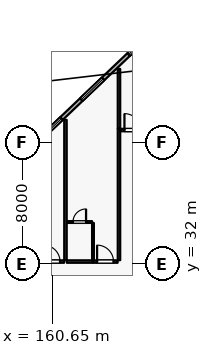
"""IFC4 building model, lengths in metres.
Left out: names, types, materials, properties, quantities, classifications, styles, units other than length and angle.
Written with IfcOpenShell. Run it as: python <this file> out.ifc"""

import sys

from ifc_helpers import new_model, si_unit, direction, frame, frame_2d, origin, place, context, subcontext, project, spatial, rectangle, extrude, element, fill, save


model = new_model("IFC4")
c1 = context("Model", 3, precision=1e-05, world=origin(), true_north=direction((0.0, 1.0)))
c2 = subcontext(c1, "Body", "Model", "MODEL_VIEW")
j1 = project(units=[si_unit("LENGTHUNIT", "METRE"), si_unit("PLANEANGLEUNIT", "RADIAN")], contexts=[c1])
p1 = place(None, origin())
s1 = spatial("IfcSite", under=j1, at=p1, CompositionType="ELEMENT")
p2 = place(p1, origin())
s2 = spatial("IfcBuilding", under=s1, at=p2, CompositionType="ELEMENT")
p3 = place(p2, frame((0.0, 0.0, 28.8)))
s3 = spatial("IfcBuildingStorey", under=s2, at=p3, CompositionType="ELEMENT", Elevation=28.8)
p4 = place(p3, frame((159.95, 40.333, 0.0), z_axis=(0.0, 0.0, 1.0), x_axis=(0.724105170588, 0.689689569247, 0.0)))
e1 = element("IfcWall", 1, at=p4, inside=s3, PredefinedType="SOLIDWALL", context=c2, shape_type="SweptSolid", body=[
    extrude(rectangle(XDim=10.634, YDim=0.24, at=frame_2d((5.317, 0.0))), origin(), (0.0, 0.0, 1.0), 2.93),
])
p5 = place(p4, frame((0.215, 0.0, 0.8)))
e2 = element("IfcOpeningElement", 2, at=p5, cuts=e1, PredefinedType="OPENING", context=c2, shape_type="SweptSolid", body=[
    extrude(rectangle(XDim=1.6, YDim=1.6, at=frame_2d((0.8, 0.8))), frame((0.0, 0.13, 0.0), z_axis=(0.0, -1.0, 0.0), x_axis=(1.0, 0.0, 0.0)), (0.0, 0.0, 1.0), 0.26),
])
p6 = place(p4, frame((3.599, 0.0, 0.8)))
e3 = element("IfcOpeningElement", 3, at=p6, cuts=e1, PredefinedType="OPENING", context=c2, shape_type="SweptSolid", body=[
    extrude(rectangle(XDim=2.0, YDim=1.75, at=frame_2d((1.0, 0.875))), frame((0.0, 0.13, 0.0), z_axis=(0.0, -1.0, 0.0), x_axis=(1.0, 0.0, 0.0)), (0.0, 0.0, 1.0), 0.26),
])
p7 = place(p4, frame((7.901, 0.0, 0.8)))
e4 = element("IfcOpeningElement", 4, at=p7, cuts=e1, PredefinedType="OPENING", context=c2, shape_type="SweptSolid", body=[
    extrude(rectangle(XDim=2.0, YDim=1.75, at=frame_2d((1.0, 0.875))), frame((0.0, 0.13, 0.0), z_axis=(0.0, -1.0, 0.0), x_axis=(1.0, 0.0, 0.0)), (0.0, 0.0, 1.0), 0.26),
])
p8 = place(p3, frame((159.81, 32.17, 0.0), z_axis=(0.0, 0.0, 1.0), x_axis=(1.0, 0.0, 0.0)))
e5 = element("IfcWall", 5, at=p8, inside=s3, PredefinedType="PARTITIONING", context=c2, shape_type="SweptSolid", body=[
    extrude(rectangle(XDim=1.62, YDim=0.16, at=frame_2d((0.81, 0.0))), origin(), (0.0, 0.0, 1.0), 3.365),
])
p9 = place(p8, frame((0.27, 0.0, 0.0)))
e6 = element("IfcOpeningElement", 6, at=p9, cuts=e5, PredefinedType="OPENING", context=c2, shape_type="SweptSolid", body=[
    extrude(rectangle(XDim=1.08, YDim=2.3, at=frame_2d((0.54, 1.15))), frame((0.0, 0.09, 0.0), z_axis=(0.0, -1.0, 0.0), x_axis=(1.0, 0.0, 0.0)), (0.0, 0.0, 1.0), 0.18),
])
p10 = place(p3, frame((161.61, 32.17, 0.0), z_axis=(0.0, 0.0, 1.0), x_axis=(1.0, 0.0, 0.0)))
e7 = element("IfcWall", 7, at=p10, inside=s3, PredefinedType="PARTITIONING", context=c2, shape_type="SweptSolid", body=[
    extrude(rectangle(XDim=1.71, YDim=0.16, at=frame_2d((0.855, 0.0))), origin(), (0.0, 0.0, 1.0), 3.365),
])
p11 = place(p3, frame((163.33, 32.17, 0.0), z_axis=(0.0, 0.0, 1.0), x_axis=(1.0, 0.0, 0.0)))
e8 = element("IfcWall", 8, at=p11, inside=s3, PredefinedType="PARTITIONING", context=c2, shape_type="SweptSolid", body=[
    extrude(rectangle(XDim=1.62, YDim=0.16, at=frame_2d((0.81, 0.0))), origin(), (0.0, 0.0, 1.0), 3.365),
])
p12 = place(p11, frame((0.27, 0.0, 0.0)))
e9 = element("IfcOpeningElement", 9, at=p12, cuts=e8, PredefinedType="OPENING", context=c2, shape_type="SweptSolid", body=[
    extrude(rectangle(XDim=1.08, YDim=2.3, at=frame_2d((0.54, 1.15))), frame((0.0, 0.09, 0.0), z_axis=(0.0, -1.0, 0.0), x_axis=(1.0, 0.0, 0.0)), (0.0, 0.0, 1.0), 0.18),
])
p13 = place(p3, frame((163.33, 32.26, 0.0), z_axis=(0.0, 0.0, 1.0), x_axis=(0.0, 1.0, 0.0)))
e10 = element("IfcWall", 10, at=p13, inside=s3, PredefinedType="PARTITIONING", context=c2, shape_type="SweptSolid", body=[
    extrude(rectangle(XDim=2.45, YDim=0.115, at=frame_2d((1.225, 0.0))), origin(), (0.0, 0.0, 1.0), 3.365),
])
p14 = place(p3, frame((161.62, 34.77, 0.0), z_axis=(0.0, 0.0, 1.0), x_axis=(1.0, 0.0, 0.0)))
e11 = element("IfcWall", 11, at=p14, inside=s3, PredefinedType="PARTITIONING", context=c2, shape_type="SweptSolid", body=[
    extrude(rectangle(XDim=1.65, YDim=0.115, at=frame_2d((0.825, 0.0))), origin(), (0.0, 0.0, 1.0), 3.365),
])
p15 = place(p14, frame((0.395, 0.0, 0.0)))
e12 = element("IfcOpeningElement", 12, at=p15, cuts=e11, PredefinedType="OPENING", context=c2, shape_type="SweptSolid", body=[
    extrude(rectangle(XDim=0.86, YDim=2.12, at=frame_2d((0.43, 1.06))), frame((0.0, 0.067, 0.0), z_axis=(0.0, -1.0, 0.0), x_axis=(1.0, 0.0, 0.0)), (0.0, 0.0, 1.0), 0.135),
])
p16 = place(p3, frame((161.52, 32.26, 0.0), z_axis=(0.0, 0.0, 1.0), x_axis=(0.0, 1.0, 0.0)))
e13 = element("IfcWall", 13, at=p16, inside=s3, PredefinedType="PARTITIONING", context=c2, shape_type="SweptSolid", body=[
    extrude(rectangle(XDim=9.23, YDim=0.16, at=frame_2d((4.615, 0.0))), origin(), (0.0, 0.0, 1.0), 3.365),
])
p17 = place(p3, frame((165.04, 32.26, 0.0), z_axis=(0.0, 0.0, 1.0), x_axis=(0.0, 1.0, 0.0)))
e14 = element("IfcWall", 14, at=p17, inside=s3, PredefinedType="PARTITIONING", context=c2, shape_type="SweptSolid", body=[
    extrude(rectangle(XDim=8.64, YDim=0.16, at=frame_2d((4.32, 0.0))), origin(), (0.0, 0.0, 1.0), 3.365),
])
p18 = place(p3, frame((165.13, 40.82, 0.0), z_axis=(0.0, 0.0, 1.0), x_axis=(1.0, 0.0, 0.0)))
e15 = element("IfcWall", 15, at=p18, inside=s3, PredefinedType="PARTITIONING", context=c2, shape_type="SweptSolid", body=[
    extrude(rectangle(XDim=1.62, YDim=0.16, at=frame_2d((0.81, 0.0))), origin(), (0.0, 0.0, 1.0), 3.365),
])
p19 = place(p18, frame((0.27, 0.0, 0.0)))
e16 = element("IfcOpeningElement", 16, at=p19, cuts=e15, PredefinedType="OPENING", context=c2, shape_type="SweptSolid", body=[
    extrude(rectangle(XDim=1.08, YDim=2.3, at=frame_2d((0.54, 1.15))), frame((0.0, 0.09, 0.0), z_axis=(0.0, -1.0, 0.0), x_axis=(1.0, 0.0, 0.0)), (0.0, 0.0, 1.0), 0.18),
])
p20 = place(p3, frame((165.04, 40.91, 0.0), z_axis=(0.0, 0.0, 1.0), x_axis=(0.0, 1.0, 0.0)))
e17 = element("IfcWall", 17, at=p20, inside=s3, PredefinedType="PARTITIONING", context=c2, shape_type="SweptSolid", body=[
    extrude(rectangle(XDim=3.93, YDim=0.16, at=frame_2d((1.965, 0.0))), origin(), (0.0, 0.0, 1.0), 3.365),
])
p21 = place(p5, origin())
e18 = element("IfcWindow", 18, at=p21, inside=s3, PartitioningType="SINGLE_PANEL", PredefinedType="WINDOW", context=c2, shape_type="SweptSolid", body=[
    extrude(rectangle(XDim=1.6, YDim=1.6, at=frame_2d((0.8, 0.8))), frame((0.0, 0.03, 0.0), z_axis=(0.0, -1.0, 0.0), x_axis=(1.0, 0.0, 0.0)), (0.0, 0.0, 1.0), 0.06),
])
fill(e2, e18)
p22 = place(p6, origin())
e19 = element("IfcWindow", 19, at=p22, inside=s3, PartitioningType="DOUBLE_PANEL_VERTICAL", PredefinedType="WINDOW", context=c2, shape_type="SweptSolid", body=[
    extrude(rectangle(XDim=2.0, YDim=1.75, at=frame_2d((1.0, 0.875))), frame((0.0, 0.03, 0.0), z_axis=(0.0, -1.0, 0.0), x_axis=(1.0, 0.0, 0.0)), (0.0, 0.0, 1.0), 0.06),
])
fill(e3, e19)
p23 = place(p7, origin())
e20 = element("IfcWindow", 20, at=p23, inside=s3, PartitioningType="DOUBLE_PANEL_VERTICAL", PredefinedType="WINDOW", context=c2, shape_type="SweptSolid", body=[
    extrude(rectangle(XDim=2.0, YDim=1.75, at=frame_2d((1.0, 0.875))), frame((0.0, 0.03, 0.0), z_axis=(0.0, -1.0, 0.0), x_axis=(1.0, 0.0, 0.0)), (0.0, 0.0, 1.0), 0.06),
])
fill(e4, e20)
p24 = place(p9, origin())
e21 = element("IfcDoor", 21, at=p24, inside=s3, OperationType="SINGLE_SWING_LEFT", PredefinedType="DOOR", context=c2, shape_type="SweptSolid", body=[
    extrude(rectangle(XDim=1.08, YDim=2.3, at=frame_2d((0.54, 1.15))), frame((0.0, 0.025, 0.0), z_axis=(0.0, -1.0, 0.0), x_axis=(1.0, 0.0, 0.0)), (0.0, 0.0, 1.0), 0.05),
])
fill(e6, e21)
p25 = place(p12, origin())
e22 = element("IfcDoor", 22, at=p25, inside=s3, OperationType="SINGLE_SWING_LEFT", PredefinedType="DOOR", context=c2, shape_type="SweptSolid", body=[
    extrude(rectangle(XDim=1.08, YDim=2.3, at=frame_2d((0.54, 1.15))), frame((0.0, 0.025, 0.0), z_axis=(0.0, -1.0, 0.0), x_axis=(1.0, 0.0, 0.0)), (0.0, 0.0, 1.0), 0.05),
])
fill(e9, e22)
p26 = place(p15, origin())
e23 = element("IfcDoor", 23, at=p26, inside=s3, OperationType="SINGLE_SWING_RIGHT", PredefinedType="DOOR", context=c2, shape_type="SweptSolid", body=[
    extrude(rectangle(XDim=0.86, YDim=2.12, at=frame_2d((0.43, 1.06))), frame((0.0, 0.025, 0.0), z_axis=(0.0, -1.0, 0.0), x_axis=(1.0, 0.0, 0.0)), (0.0, 0.0, 1.0), 0.05),
])
fill(e12, e23)
p27 = place(p19, origin())
e24 = element("IfcDoor", 24, at=p27, inside=s3, OperationType="SINGLE_SWING_LEFT", PredefinedType="DOOR", context=c2, shape_type="SweptSolid", body=[
    extrude(rectangle(XDim=1.08, YDim=2.3, at=frame_2d((0.54, 1.15))), frame((0.0, 0.025, 0.0), z_axis=(0.0, -1.0, 0.0), x_axis=(1.0, 0.0, 0.0)), (0.0, 0.0, 1.0), 0.05),
])
fill(e16, e24)
save(model, sys.argv[1])
